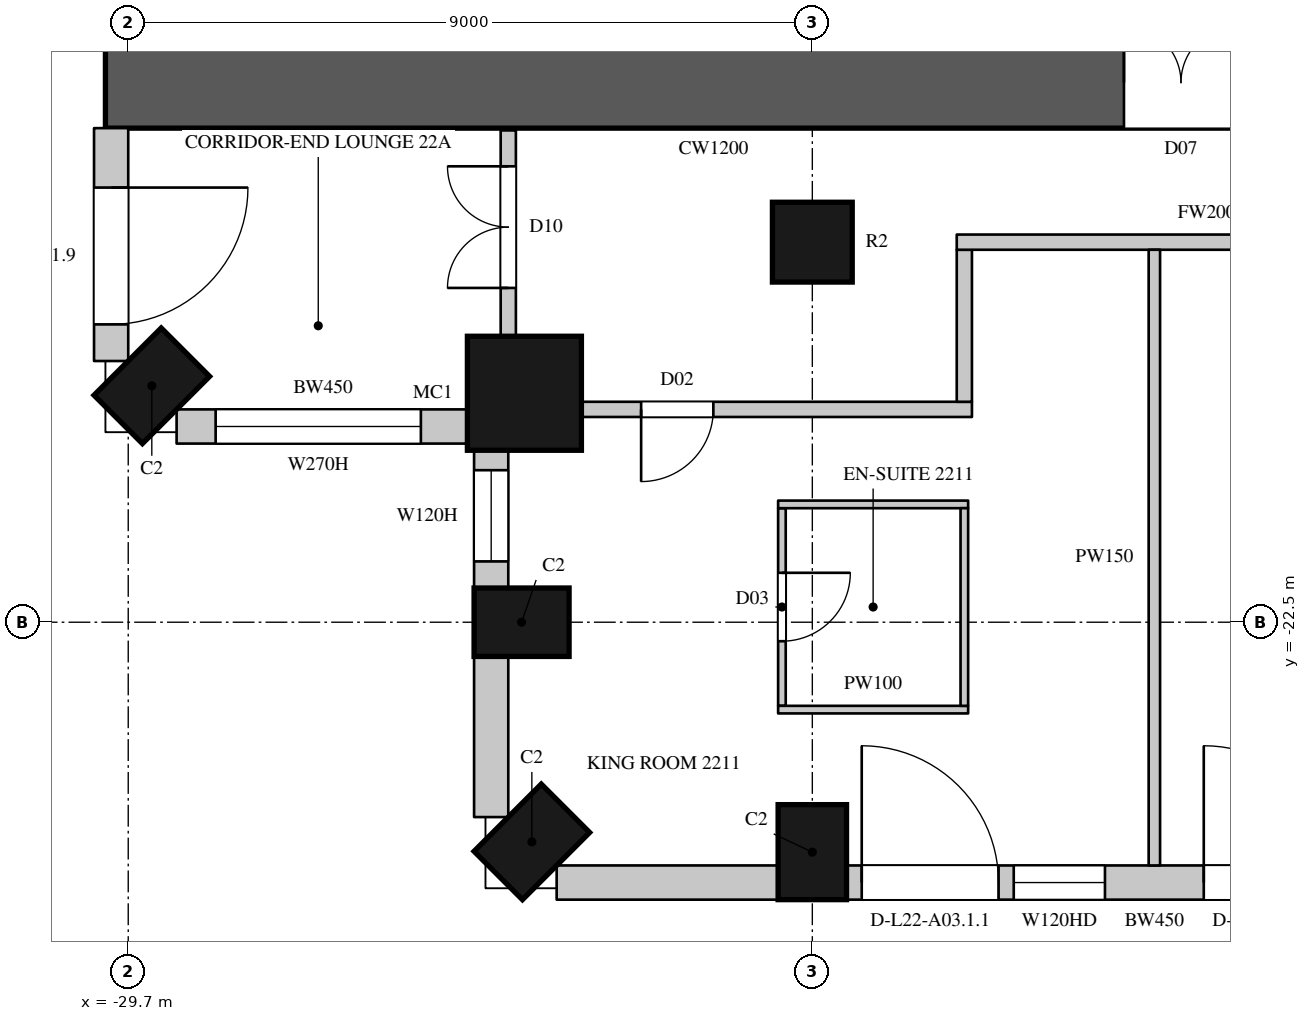
"""IFC4 building model, lengths in metres.
Left out: names, types, materials, properties, quantities, classifications, styles, units other than length and angle.
Written with IfcOpenShell. Run it as: python <this file> out.ifc"""

import sys

from ifc_helpers import new_model, si_unit, direction, frame, frame_2d, origin, origin_2d, place, context, subcontext, project, spatial, rectangle, circle, extrude, element, fill, save


model = new_model("IFC4")
c1 = context("Model", 3, precision=1e-05, world=origin(), true_north=direction((0.0, 1.0)))
c2 = subcontext(c1, "Body", "Model", "MODEL_VIEW")
j1 = project(units=[si_unit("LENGTHUNIT", "METRE"), si_unit("PLANEANGLEUNIT", "RADIAN")], contexts=[c1])
p1 = place(None, origin())
s1 = spatial("IfcSite", under=j1, at=p1, CompositionType="ELEMENT")
p2 = place(p1, origin())
s2 = spatial("IfcBuilding", under=s1, at=p2, CompositionType="ELEMENT")
p3 = place(p2, frame((0.0, 0.0, 109.5)))
s3 = spatial("IfcBuildingStorey", under=s2, at=p3, CompositionType="ELEMENT", Elevation=109.5)
p4 = place(p3, frame((-29.39, -19.39, 0.0), z_axis=(0.0, 0.0, 1.0), x_axis=(0.707106781187, -0.707106781187, 0.0)))
e1 = element("IfcColumn", 1, at=p4, inside=s3, PredefinedType="COLUMN", context=c2, shape_type="SweptSolid", body=[
    extrude(rectangle(XDim=0.9, YDim=1.25, at=origin_2d()), origin(), (0.0, 0.0, 1.0), 3.6),
])
p5 = place(p3, frame((-24.488, -19.488, 0.0), z_axis=(0.0, 0.0, 1.0), x_axis=(1.0, 0.0, 0.0)))
e2 = element("IfcColumn", 2, at=p5, inside=s3, PredefinedType="COLUMN", context=c2, shape_type="SweptSolid", body=[
    extrude(circle(Radius=0.75, at=origin_2d()), origin(), (0.0, 0.0, 1.0), 3.6),
])
for number, where, z_axis, x_axis in (
    (3, (-24.525, -22.5, 0.0), (0.0, 0.0, 1.0), (0.0, -1.0, 0.0)),
    (4, (-24.39, -25.39, 0.0), (0.0, 0.0, 1.0), (0.707, -0.707, 0.0)),
    (5, (-20.7, -25.525, 0.0), (0.0, 0.0, 1.0), (1.0, 0.0, 0.0)),
):
    element("IfcColumn", number, at=place(p3, frame(where, z_axis=z_axis, x_axis=x_axis)), inside=s3, PredefinedType="COLUMN", context=c2, shape_type="SweptSolid", body=[
        extrude(rectangle(XDim=0.9, YDim=1.25, at=origin_2d()), origin(), (0.0, 0.0, 1.0), 3.6),
    ])
p6 = place(p3, frame((-20.7, -17.5, 0.0), z_axis=(0.0, 0.0, 1.0), x_axis=(1.0, 0.0, 0.0)))
e6 = element("IfcColumn", 6, at=p6, inside=s3, PredefinedType="COLUMN", context=c2, shape_type="SweptSolid", body=[
    extrude(circle(Radius=0.525, at=origin_2d()), origin(), (0.0, 0.0, 1.0), 3.6),
])
p7 = place(p3, frame((-29.925, -16.0, 0.0), z_axis=(0.0, 0.0, 1.0), x_axis=(0.0, -1.0, 0.0)))
e7 = element("IfcWall", 7, at=p7, inside=s3, PredefinedType="SOLIDWALL", context=c2, shape_type="SweptSolid", body=[
    extrude(rectangle(XDim=3.064, YDim=0.45, at=frame_2d((1.532, 0.0))), origin(), (0.0, 0.0, 1.0), 3.3),
])
p8 = place(p7, frame((0.782, 0.0, 0.0)))
e8 = element("IfcOpeningElement", 8, at=p8, cuts=e7, PredefinedType="OPENING", context=c2, shape_type="SweptSolid", body=[
    extrude(rectangle(XDim=1.8, YDim=2.4, at=frame_2d((0.9, 1.2))), frame((0.0, 0.235, 0.0), z_axis=(0.0, -1.0, 0.0), x_axis=(1.0, 0.0, 0.0)), (0.0, 0.0, 1.0), 0.47),
])
p9 = place(p3, frame((-29.064, -19.925, 0.0), z_axis=(0.0, 0.0, 1.0), x_axis=(1.0, 0.0, 0.0)))
e9 = element("IfcWall", 9, at=p9, inside=s3, PredefinedType="SOLIDWALL", context=c2, shape_type="SweptSolid", body=[
    extrude(rectangle(XDim=3.857, YDim=0.45, at=frame_2d((1.928, 0.0))), origin(), (0.0, 0.0, 1.0), 3.3),
])
p10 = place(p9, frame((0.514, 0.0, 1.05)))
e10 = element("IfcOpeningElement", 10, at=p10, cuts=e9, PredefinedType="OPENING", context=c2, shape_type="SweptSolid", body=[
    extrude(rectangle(XDim=2.7, YDim=2.0, at=frame_2d((1.35, 1.0))), frame((0.0, 0.235, 0.0), z_axis=(0.0, -1.0, 0.0), x_axis=(1.0, 0.0, 0.0)), (0.0, 0.0, 1.0), 0.47),
])
p11 = place(p3, frame((-24.925, -20.207, 0.0), z_axis=(0.0, 0.0, 1.0), x_axis=(0.0, -1.0, 0.0)))
e11 = element("IfcWall", 11, at=p11, inside=s3, PredefinedType="SOLIDWALL", context=c2, shape_type="SweptSolid", body=[
    extrude(rectangle(XDim=1.843, YDim=0.45, at=frame_2d((0.921, 0.0))), origin(), (0.0, 0.0, 1.0), 3.3),
])
p12 = place(p11, frame((0.293, 0.0, 1.05)))
e12 = element("IfcOpeningElement", 12, at=p12, cuts=e11, PredefinedType="OPENING", context=c2, shape_type="SweptSolid", body=[
    extrude(rectangle(XDim=1.2, YDim=2.0, at=frame_2d((0.6, 1.0))), frame((0.0, 0.235, 0.0), z_axis=(0.0, -1.0, 0.0), x_axis=(1.0, 0.0, 0.0)), (0.0, 0.0, 1.0), 0.47),
])
p13 = place(p3, frame((-24.925, -22.95, 0.0), z_axis=(0.0, 0.0, 1.0), x_axis=(0.0, -1.0, 0.0)))
e13 = element("IfcWall", 13, at=p13, inside=s3, PredefinedType="SOLIDWALL", context=c2, shape_type="SweptSolid", body=[
    extrude(rectangle(XDim=2.114, YDim=0.45, at=frame_2d((1.057, 0.0))), origin(), (0.0, 0.0, 1.0), 3.3),
])
p14 = place(p3, frame((-24.064, -25.925, 0.0), z_axis=(0.0, 0.0, 1.0), x_axis=(1.0, 0.0, 0.0)))
e14 = element("IfcWall", 14, at=p14, inside=s3, PredefinedType="SOLIDWALL", context=c2, shape_type="SweptSolid", body=[
    extrude(rectangle(XDim=2.914, YDim=0.45, at=frame_2d((1.457, 0.0))), origin(), (0.0, 0.0, 1.0), 3.3),
])
p15 = place(p3, frame((-20.25, -25.925, 0.0), z_axis=(0.0, 0.0, 1.0), x_axis=(1.0, 0.0, 0.0)))
e15 = element("IfcWall", 15, at=p15, inside=s3, PredefinedType="SOLIDWALL", context=c2, shape_type="SweptSolid", body=[
    extrude(rectangle(XDim=8.1, YDim=0.45, at=frame_2d((4.05, 0.0))), origin(), (0.0, 0.0, 1.0), 3.3),
])
p16 = place(p15, frame((0.2, 0.0, 0.0)))
e16 = element("IfcOpeningElement", 16, at=p16, cuts=e15, PredefinedType="OPENING", context=c2, shape_type="SweptSolid", body=[
    extrude(rectangle(XDim=1.8, YDim=2.4, at=frame_2d((0.9, 1.2))), frame((0.0, 0.235, 0.0), z_axis=(0.0, -1.0, 0.0), x_axis=(1.0, 0.0, 0.0)), (0.0, 0.0, 1.0), 0.47),
])
p17 = place(p15, frame((2.2, 0.0, 1.05)))
e17 = element("IfcOpeningElement", 17, at=p17, cuts=e15, PredefinedType="OPENING", context=c2, shape_type="SweptSolid", body=[
    extrude(rectangle(XDim=1.2, YDim=2.0, at=frame_2d((0.6, 1.0))), frame((0.0, 0.235, 0.0), z_axis=(0.0, -1.0, 0.0), x_axis=(1.0, 0.0, 0.0)), (0.0, 0.0, 1.0), 0.47),
])
p18 = place(p15, frame((4.7, 0.0, 0.0)))
e18 = element("IfcOpeningElement", 18, at=p18, cuts=e15, PredefinedType="OPENING", context=c2, shape_type="SweptSolid", body=[
    extrude(rectangle(XDim=1.8, YDim=2.4, at=frame_2d((0.9, 1.2))), frame((0.0, 0.235, 0.0), z_axis=(0.0, -1.0, 0.0), x_axis=(1.0, 0.0, 0.0)), (0.0, 0.0, 1.0), 0.47),
])
p19 = place(p15, frame((6.7, 0.0, 1.05)))
e19 = element("IfcOpeningElement", 19, at=p19, cuts=e15, PredefinedType="OPENING", context=c2, shape_type="SweptSolid", body=[
    extrude(rectangle(XDim=1.2, YDim=2.0, at=frame_2d((0.6, 1.0))), frame((0.0, 0.235, 0.0), z_axis=(0.0, -1.0, 0.0), x_axis=(1.0, 0.0, 0.0)), (0.0, 0.0, 1.0), 0.47),
])
p20 = place(p3, frame((-30.0, -15.4, 0.0), z_axis=(0.0, 0.0, 1.0), x_axis=(1.0, 0.0, 0.0)))
e20 = element("IfcWall", 20, at=p20, inside=s3, PredefinedType="SHEAR", context=c2, shape_type="SweptSolid", body=[
    extrude(rectangle(XDim=16.0, YDim=1.2, at=frame_2d((8.0, 0.0))), origin(), (0.0, 0.0, 1.0), 3.6),
])
p21 = place(p20, frame((13.4, 0.0, 0.0)))
e21 = element("IfcOpeningElement", 21, at=p21, cuts=e20, PredefinedType="OPENING", context=c2, shape_type="SweptSolid", body=[
    extrude(rectangle(XDim=1.5, YDim=2.4, at=frame_2d((0.75, 1.2))), frame((0.0, 0.61, 0.0), z_axis=(0.0, -1.0, 0.0), x_axis=(1.0, 0.0, 0.0)), (0.0, 0.0, 1.0), 1.22),
])
p22 = place(p3, frame((-24.7, -18.752, 0.0), z_axis=(0.0, 0.0, 1.0), x_axis=(0.0, 1.0, 0.0)))
e22 = element("IfcWall", 22, at=p22, inside=s3, PredefinedType="PARTITIONING", context=c2, shape_type="SweptSolid", body=[
    extrude(rectangle(XDim=2.722, YDim=0.2, at=frame_2d((1.361, 0.0))), origin(), (0.0, 0.0, 1.0), 3.3),
])
p23 = place(p22, frame((0.65, 0.0, 0.0)))
e23 = element("IfcOpeningElement", 23, at=p23, cuts=e22, PredefinedType="OPENING", context=c2, shape_type="SweptSolid", body=[
    extrude(rectangle(XDim=1.6, YDim=2.4, at=frame_2d((0.8, 1.2))), frame((0.0, 0.11, 0.0), z_axis=(0.0, -1.0, 0.0), x_axis=(1.0, 0.0, 0.0)), (0.0, 0.0, 1.0), 0.22),
])
p24 = place(p3, frame((-23.752, -19.7, 0.0), z_axis=(0.0, 0.0, 1.0), x_axis=(1.0, 0.0, 0.0)))
e24 = element("IfcWall", 24, at=p24, inside=s3, PredefinedType="PARTITIONING", context=c2, shape_type="SweptSolid", body=[
    extrude(rectangle(XDim=5.152, YDim=0.2, at=frame_2d((2.576, 0.0))), origin(), (0.0, 0.0, 1.0), 3.3),
])
p25 = place(p24, frame((0.8, 0.0, 0.0)))
e25 = element("IfcOpeningElement", 25, at=p25, cuts=e24, PredefinedType="OPENING", context=c2, shape_type="SweptSolid", body=[
    extrude(rectangle(XDim=0.95, YDim=2.2, at=frame_2d((0.475, 1.1))), frame((0.0, 0.11, 0.0), z_axis=(0.0, -1.0, 0.0), x_axis=(1.0, 0.0, 0.0)), (0.0, 0.0, 1.0), 0.22),
])
p26 = place(p3, frame((-18.7, -19.6, 0.0), z_axis=(0.0, 0.0, 1.0), x_axis=(0.0, 1.0, 0.0)))
e26 = element("IfcWall", 26, at=p26, inside=s3, PredefinedType="PARTITIONING", context=c2, shape_type="SweptSolid", body=[
    extrude(rectangle(XDim=2.0, YDim=0.2, at=frame_2d((1.0, 0.0))), origin(), (0.0, 0.0, 1.0), 3.3),
])
p27 = place(p3, frame((-18.8, -17.5, 0.0), z_axis=(0.0, 0.0, 1.0), x_axis=(1.0, 0.0, 0.0)))
e27 = element("IfcWall", 27, at=p27, inside=s3, PredefinedType="PARTITIONING", context=c2, shape_type="SweptSolid", body=[
    extrude(rectangle(XDim=6.575, YDim=0.2, at=frame_2d((3.288, 0.0))), origin(), (0.0, 0.0, 1.0), 2.75),
])
p28 = place(p27, frame((3.85, 0.0, 0.0)))
e28 = element("IfcOpeningElement", 28, at=p28, cuts=e27, PredefinedType="OPENING", context=c2, shape_type="SweptSolid", body=[
    extrude(rectangle(XDim=1.1, YDim=2.4, at=frame_2d((0.55, 1.2))), frame((0.0, 0.11, 0.0), z_axis=(0.0, -1.0, 0.0), x_axis=(1.0, 0.0, 0.0)), (0.0, 0.0, 1.0), 0.22),
])
p29 = place(p3, frame((-16.2, -25.7, 0.0), z_axis=(0.0, 0.0, 1.0), x_axis=(0.0, 1.0, 0.0)))
e29 = element("IfcWall", 29, at=p29, inside=s3, PredefinedType="PARTITIONING", context=c2, shape_type="SweptSolid", body=[
    extrude(rectangle(XDim=8.1, YDim=0.15, at=frame_2d((4.05, 0.0))), origin(), (0.0, 0.0, 1.0), 2.65),
])
p30 = place(p3, frame((-21.1, -23.6, 0.0), z_axis=(0.0, 0.0, 1.0), x_axis=(0.0, 1.0, 0.0)))
e30 = element("IfcWall", 30, at=p30, inside=s3, PredefinedType="PARTITIONING", context=c2, shape_type="SweptSolid", body=[
    extrude(rectangle(XDim=2.6, YDim=0.1, at=frame_2d((1.3, 0.0))), origin(), (0.0, 0.0, 1.0), 3.3),
])
p31 = place(p30, frame((0.85, 0.0, 0.0)))
e31 = element("IfcOpeningElement", 31, at=p31, cuts=e30, PredefinedType="OPENING", context=c2, shape_type="SweptSolid", body=[
    extrude(rectangle(XDim=0.9, YDim=2.2, at=frame_2d((0.45, 1.1))), frame((0.0, 0.06, 0.0), z_axis=(0.0, -1.0, 0.0), x_axis=(1.0, 0.0, 0.0)), (0.0, 0.0, 1.0), 0.12),
])
for number, where, z_axis, x_axis in (
    (32, (-21.15, -23.65, 0.0), (0.0, 0.0, 1.0), (1.0, 0.0, 0.0)),
    (33, (-21.15, -20.95, 0.0), (0.0, 0.0, 1.0), (1.0, 0.0, 0.0)),
):
    element("IfcWall", number, at=place(p3, frame(where, z_axis=z_axis, x_axis=x_axis)), inside=s3, PredefinedType="PARTITIONING", context=c2, shape_type="SweptSolid", body=[
        extrude(rectangle(XDim=2.5, YDim=0.1, at=frame_2d((1.25, 0.0))), origin(), (0.0, 0.0, 1.0), 3.3),
    ])
p32 = place(p3, frame((-18.7, -23.6, 0.0), z_axis=(0.0, 0.0, 1.0), x_axis=(0.0, 1.0, 0.0)))
e34 = element("IfcWall", 34, at=p32, inside=s3, PredefinedType="PARTITIONING", context=c2, shape_type="SweptSolid", body=[
    extrude(rectangle(XDim=2.6, YDim=0.1, at=frame_2d((1.3, 0.0))), origin(), (0.0, 0.0, 1.0), 3.3),
])
p33 = place(p8, origin())
e35 = element("IfcDoor", 35, at=p33, inside=s3, OperationType="SLIDING_TO_LEFT", PredefinedType="DOOR", context=c2, shape_type="SweptSolid", body=[
    extrude(rectangle(XDim=1.8, YDim=2.4, at=frame_2d((0.9, 1.2))), frame((0.0, 0.13, 0.0), z_axis=(0.0, -1.0, 0.0), x_axis=(1.0, 0.0, 0.0)), (0.0, 0.0, 1.0), 0.05),
])
fill(e8, e35)
p34 = place(p10, origin())
e36 = element("IfcWindow", 36, at=p34, inside=s3, PartitioningType="SINGLE_PANEL", PredefinedType="WINDOW", context=c2, shape_type="SweptSolid", body=[
    extrude(rectangle(XDim=2.7, YDim=2.0, at=frame_2d((1.35, 1.0))), frame((0.0, 0.135, 0.0), z_axis=(0.0, -1.0, 0.0), x_axis=(1.0, 0.0, 0.0)), (0.0, 0.0, 1.0), 0.06),
])
fill(e10, e36)
p35 = place(p12, origin())
e37 = element("IfcWindow", 37, at=p35, inside=s3, PartitioningType="SINGLE_PANEL", PredefinedType="WINDOW", context=c2, shape_type="SweptSolid", body=[
    extrude(rectangle(XDim=1.2, YDim=2.0, at=frame_2d((0.6, 1.0))), frame((0.0, 0.135, 0.0), z_axis=(0.0, -1.0, 0.0), x_axis=(1.0, 0.0, 0.0)), (0.0, 0.0, 1.0), 0.06),
])
fill(e12, e37)
p36 = place(p16, origin())
e38 = element("IfcDoor", 38, at=p36, inside=s3, OperationType="SLIDING_TO_LEFT", PredefinedType="DOOR", context=c2, shape_type="SweptSolid", body=[
    extrude(rectangle(XDim=1.8, YDim=2.4, at=frame_2d((0.9, 1.2))), frame((0.0, 0.13, 0.0), z_axis=(0.0, -1.0, 0.0), x_axis=(1.0, 0.0, 0.0)), (0.0, 0.0, 1.0), 0.05),
])
fill(e16, e38)
p37 = place(p17, origin())
e39 = element("IfcWindow", 39, at=p37, inside=s3, PartitioningType="SINGLE_PANEL", PredefinedType="WINDOW", context=c2, shape_type="SweptSolid", body=[
    extrude(rectangle(XDim=1.2, YDim=2.0, at=frame_2d((0.6, 1.0))), frame((0.0, 0.135, 0.0), z_axis=(0.0, -1.0, 0.0), x_axis=(1.0, 0.0, 0.0)), (0.0, 0.0, 1.0), 0.06),
])
fill(e17, e39)
p38 = place(p18, origin())
e40 = element("IfcDoor", 40, at=p38, inside=s3, OperationType="SLIDING_TO_LEFT", PredefinedType="DOOR", context=c2, shape_type="SweptSolid", body=[
    extrude(rectangle(XDim=1.8, YDim=2.4, at=frame_2d((0.9, 1.2))), frame((0.0, 0.13, 0.0), z_axis=(0.0, -1.0, 0.0), x_axis=(1.0, 0.0, 0.0)), (0.0, 0.0, 1.0), 0.05),
])
fill(e18, e40)
p39 = place(p23, origin())
e41 = element("IfcDoor", 41, at=p39, inside=s3, OperationType="DOUBLE_DOOR_SINGLE_SWING", PredefinedType="DOOR", context=c2, shape_type="SweptSolid", body=[
    extrude(rectangle(XDim=1.6, YDim=2.4, at=frame_2d((0.8, 1.2))), frame((0.0, 0.025, 0.0), z_axis=(0.0, -1.0, 0.0), x_axis=(1.0, 0.0, 0.0)), (0.0, 0.0, 1.0), 0.05),
])
fill(e23, e41)
p40 = place(p25, origin())
e42 = element("IfcDoor", 42, at=p40, inside=s3, OperationType="SINGLE_SWING_RIGHT", PredefinedType="DOOR", context=c2, shape_type="SweptSolid", body=[
    extrude(rectangle(XDim=0.95, YDim=2.2, at=frame_2d((0.475, 1.1))), frame((0.0, 0.025, 0.0), z_axis=(0.0, -1.0, 0.0), x_axis=(1.0, 0.0, 0.0)), (0.0, 0.0, 1.0), 0.05),
])
fill(e25, e42)
p41 = place(p31, origin())
e43 = element("IfcDoor", 43, at=p41, inside=s3, OperationType="SINGLE_SWING_LEFT", PredefinedType="DOOR", context=c2, shape_type="SweptSolid", body=[
    extrude(rectangle(XDim=0.9, YDim=2.2, at=frame_2d((0.45, 1.1))), frame((0.0, 0.025, 0.0), z_axis=(0.0, -1.0, 0.0), x_axis=(1.0, 0.0, 0.0)), (0.0, 0.0, 1.0), 0.05),
])
fill(e31, e43)
p42 = place(p21, origin())
e44 = element("IfcDoor", 44, at=p42, inside=s3, OperationType="DOUBLE_DOOR_SINGLE_SWING", PredefinedType="DOOR", context=c2, shape_type="SweptSolid", body=[
    extrude(rectangle(XDim=1.5, YDim=2.4, at=frame_2d((0.75, 1.2))), frame((0.0, 0.025, 0.0), z_axis=(0.0, -1.0, 0.0), x_axis=(1.0, 0.0, 0.0)), (0.0, 0.0, 1.0), 0.05),
])
fill(e21, e44)
save(model, sys.argv[1])
